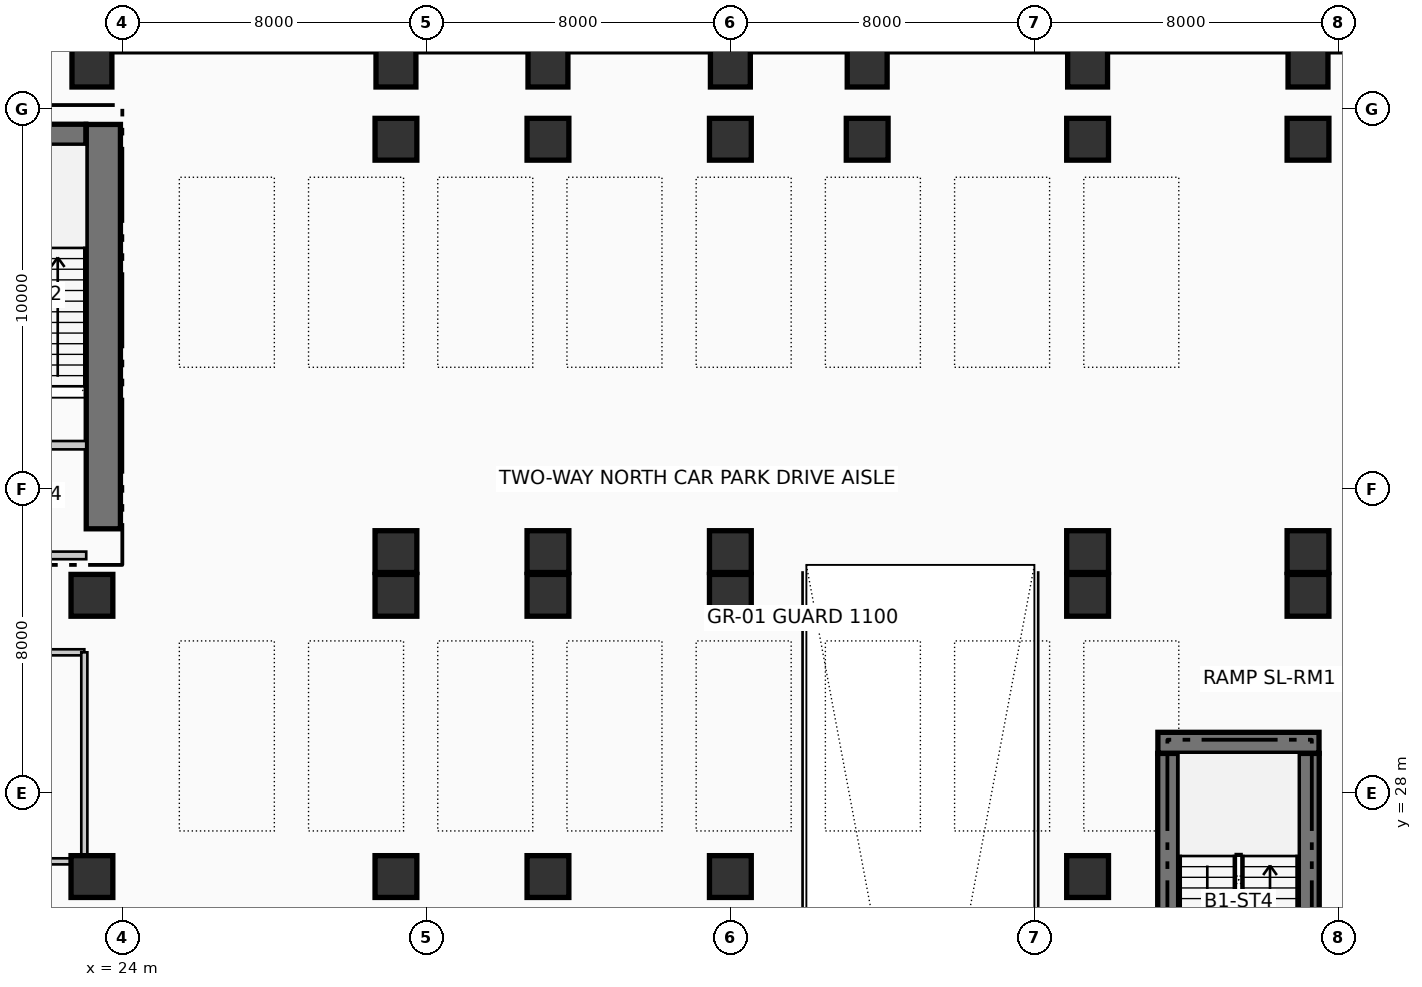
"""IFC4 building model, lengths in metres.
Left out: names, types, materials, properties, quantities, classifications, styles, units other than length and angle.
Written with IfcOpenShell. Run it as: python <this file> out.ifc"""

import sys

from ifc_helpers import new_model, si_unit, direction, frame, frame_2d, origin, origin_2d, place, context, subcontext, project, spatial, rectangle, extrude, element, save


model = new_model("IFC4")
c1 = context("Model", 3, precision=1e-05, world=origin(), true_north=direction((0.0, 1.0)))
c2 = subcontext(c1, "Body", "Model", "MODEL_VIEW")
j1 = project(units=[si_unit("LENGTHUNIT", "METRE"), si_unit("PLANEANGLEUNIT", "RADIAN")], contexts=[c1])
p1 = place(None, origin())
s1 = spatial("IfcSite", under=j1, at=p1, CompositionType="ELEMENT")
p2 = place(p1, origin())
s2 = spatial("IfcBuilding", under=s1, at=p2, CompositionType="ELEMENT")
p3 = place(p2, frame((0.0, 0.0, -4.62)))
s3 = spatial("IfcBuildingStorey", under=s2, at=p3, CompositionType="ELEMENT", Elevation=-4.62)
p4 = place(p3, frame((23.5, 34.95, 0.0), z_axis=(0.0, 0.0, 1.0), x_axis=(0.0, 1.0, 0.0)))
e1 = element("IfcWall", 1, at=p4, inside=s3, PredefinedType="SHEAR", context=c2, shape_type="SweptSolid", body=[
    extrude(rectangle(XDim=10.64, YDim=0.9, at=frame_2d((5.32, 0.0))), origin(), (0.0, 0.0, 1.0), 4.62),
])
p5 = place(p3, frame((19.35, 45.32, 0.0), z_axis=(0.0, 0.0, 1.0), x_axis=(1.0, 0.0, 0.0)))
e2 = element("IfcWall", 2, at=p5, inside=s3, PredefinedType="SHEAR", context=c2, shape_type="SweptSolid", body=[
    extrude(rectangle(XDim=3.69, YDim=0.55, at=frame_2d((1.845, 0.0))), origin(), (0.0, 0.0, 1.0), 4.62),
])
for number, where, z_axis, x_axis in (
    (3, (51.52, 21.15, 0.0), (0.0, 0.0, 1.0), (0.0, 1.0, 0.0)),
    (4, (55.22, 21.15, 0.0), (0.0, 0.0, 1.0), (0.0, 1.0, 0.0)),
):
    element("IfcWall", number, at=place(p3, frame(where, z_axis=z_axis, x_axis=x_axis)), inside=s3, PredefinedType="SHEAR", context=c2, shape_type="SweptSolid", body=[
        extrude(rectangle(XDim=7.89, YDim=0.55, at=frame_2d((3.945, 0.0))), origin(), (0.0, 0.0, 1.0), 4.62),
    ])
p6 = place(p3, frame((51.25, 29.32, 0.0), z_axis=(0.0, 0.0, 1.0), x_axis=(1.0, 0.0, 0.0)))
e5 = element("IfcWall", 5, at=p6, inside=s3, PredefinedType="SHEAR", context=c2, shape_type="SweptSolid", body=[
    extrude(rectangle(XDim=4.24, YDim=0.55, at=frame_2d((2.12, 0.0))), origin(), (0.0, 0.0, 1.0), 4.62),
])
for number, where, z_axis, x_axis in (
    (6, (23.2, 25.8, 0.0), (0.0, 0.0, 1.0), (1.0, 0.0, 0.0)),
    (7, (23.2, 33.2, 0.0), (0.0, 0.0, 1.0), (1.0, 0.0, 0.0)),
):
    element("IfcColumn", number, at=place(p3, frame(where, z_axis=z_axis, x_axis=x_axis)), inside=s3, PredefinedType="COLUMN", context=c2, shape_type="SweptSolid", body=[
        extrude(rectangle(XDim=1.1, YDim=1.1, at=origin_2d()), origin(), (0.0, 0.0, 1.0), 4.62),
    ])
p7 = place(p3, frame((23.2, 47.1, 0.0), z_axis=(0.0, 0.0, 1.0), x_axis=(1.0, 0.0, 0.0)))
e8 = element("IfcColumn", 8, at=p7, inside=s3, PredefinedType="COLUMN", context=c2, shape_type="SweptSolid", body=[
    extrude(rectangle(XDim=1.05, YDim=1.05, at=origin_2d()), origin(), (0.0, 0.0, 1.0), 4.62),
])
for number, where, z_axis, x_axis in (
    (9, (31.2, 25.8, 0.0), (0.0, 0.0, 1.0), (1.0, 0.0, 0.0)),
    (10, (31.2, 33.2, 0.0), (0.0, 0.0, 1.0), (1.0, 0.0, 0.0)),
    (11, (31.2, 34.35, 0.0), (0.0, 0.0, 1.0), (1.0, 0.0, 0.0)),
    (12, (31.2, 45.2, 0.0), (0.0, 0.0, 1.0), (1.0, 0.0, 0.0)),
):
    element("IfcColumn", number, at=place(p3, frame(where, z_axis=z_axis, x_axis=x_axis)), inside=s3, PredefinedType="COLUMN", context=c2, shape_type="SweptSolid", body=[
        extrude(rectangle(XDim=1.1, YDim=1.1, at=origin_2d()), origin(), (0.0, 0.0, 1.0), 4.62),
    ])
p8 = place(p3, frame((31.2, 47.1, 0.0), z_axis=(0.0, 0.0, 1.0), x_axis=(1.0, 0.0, 0.0)))
e13 = element("IfcColumn", 13, at=p8, inside=s3, PredefinedType="COLUMN", context=c2, shape_type="SweptSolid", body=[
    extrude(rectangle(XDim=1.05, YDim=1.05, at=origin_2d()), origin(), (0.0, 0.0, 1.0), 4.62),
])
for number, where, z_axis, x_axis in (
    (14, (35.2, 25.8, 0.0), (0.0, 0.0, 1.0), (1.0, 0.0, 0.0)),
    (15, (35.2, 33.2, 0.0), (0.0, 0.0, 1.0), (1.0, 0.0, 0.0)),
    (16, (35.2, 34.35, 0.0), (0.0, 0.0, 1.0), (1.0, 0.0, 0.0)),
    (17, (35.2, 45.2, 0.0), (0.0, 0.0, 1.0), (1.0, 0.0, 0.0)),
):
    element("IfcColumn", number, at=place(p3, frame(where, z_axis=z_axis, x_axis=x_axis)), inside=s3, PredefinedType="COLUMN", context=c2, shape_type="SweptSolid", body=[
        extrude(rectangle(XDim=1.1, YDim=1.1, at=origin_2d()), origin(), (0.0, 0.0, 1.0), 4.62),
    ])
p9 = place(p3, frame((35.2, 47.1, 0.0), z_axis=(0.0, 0.0, 1.0), x_axis=(1.0, 0.0, 0.0)))
e18 = element("IfcColumn", 18, at=p9, inside=s3, PredefinedType="COLUMN", context=c2, shape_type="SweptSolid", body=[
    extrude(rectangle(XDim=1.05, YDim=1.05, at=origin_2d()), origin(), (0.0, 0.0, 1.0), 4.62),
])
for number, where, z_axis, x_axis in (
    (19, (40.0, 25.8, 0.0), (0.0, 0.0, 1.0), (1.0, 0.0, 0.0)),
    (20, (40.0, 33.2, 0.0), (0.0, 0.0, 1.0), (1.0, 0.0, 0.0)),
    (21, (40.0, 34.35, 0.0), (0.0, 0.0, 1.0), (1.0, 0.0, 0.0)),
    (22, (40.0, 45.2, 0.0), (0.0, 0.0, 1.0), (1.0, 0.0, 0.0)),
):
    element("IfcColumn", number, at=place(p3, frame(where, z_axis=z_axis, x_axis=x_axis)), inside=s3, PredefinedType="COLUMN", context=c2, shape_type="SweptSolid", body=[
        extrude(rectangle(XDim=1.1, YDim=1.1, at=origin_2d()), origin(), (0.0, 0.0, 1.0), 4.62),
    ])
p10 = place(p3, frame((40.0, 47.1, 0.0), z_axis=(0.0, 0.0, 1.0), x_axis=(1.0, 0.0, 0.0)))
e23 = element("IfcColumn", 23, at=p10, inside=s3, PredefinedType="COLUMN", context=c2, shape_type="SweptSolid", body=[
    extrude(rectangle(XDim=1.05, YDim=1.05, at=origin_2d()), origin(), (0.0, 0.0, 1.0), 4.62),
])
p11 = place(p3, frame((43.6, 45.2, 0.0), z_axis=(0.0, 0.0, 1.0), x_axis=(1.0, 0.0, 0.0)))
e24 = element("IfcColumn", 24, at=p11, inside=s3, PredefinedType="COLUMN", context=c2, shape_type="SweptSolid", body=[
    extrude(rectangle(XDim=1.1, YDim=1.1, at=origin_2d()), origin(), (0.0, 0.0, 1.0), 4.62),
])
p12 = place(p3, frame((43.6, 47.1, 0.0), z_axis=(0.0, 0.0, 1.0), x_axis=(1.0, 0.0, 0.0)))
e25 = element("IfcColumn", 25, at=p12, inside=s3, PredefinedType="COLUMN", context=c2, shape_type="SweptSolid", body=[
    extrude(rectangle(XDim=1.05, YDim=1.05, at=origin_2d()), origin(), (0.0, 0.0, 1.0), 4.62),
])
for number, where, z_axis, x_axis in (
    (26, (49.4, 25.8, 0.0), (0.0, 0.0, 1.0), (1.0, 0.0, 0.0)),
    (27, (49.4, 33.2, 0.0), (0.0, 0.0, 1.0), (1.0, 0.0, 0.0)),
    (28, (49.4, 34.35, 0.0), (0.0, 0.0, 1.0), (1.0, 0.0, 0.0)),
    (29, (49.4, 45.2, 0.0), (0.0, 0.0, 1.0), (1.0, 0.0, 0.0)),
):
    element("IfcColumn", number, at=place(p3, frame(where, z_axis=z_axis, x_axis=x_axis)), inside=s3, PredefinedType="COLUMN", context=c2, shape_type="SweptSolid", body=[
        extrude(rectangle(XDim=1.1, YDim=1.1, at=origin_2d()), origin(), (0.0, 0.0, 1.0), 4.62),
    ])
p13 = place(p3, frame((49.4, 47.1, 0.0), z_axis=(0.0, 0.0, 1.0), x_axis=(1.0, 0.0, 0.0)))
e30 = element("IfcColumn", 30, at=p13, inside=s3, PredefinedType="COLUMN", context=c2, shape_type="SweptSolid", body=[
    extrude(rectangle(XDim=1.05, YDim=1.05, at=origin_2d()), origin(), (0.0, 0.0, 1.0), 4.62),
])
for number, where, z_axis, x_axis in (
    (31, (55.2, 33.2, 0.0), (0.0, 0.0, 1.0), (1.0, 0.0, 0.0)),
    (32, (55.2, 34.35, 0.0), (0.0, 0.0, 1.0), (1.0, 0.0, 0.0)),
    (33, (55.2, 45.2, 0.0), (0.0, 0.0, 1.0), (1.0, 0.0, 0.0)),
):
    element("IfcColumn", number, at=place(p3, frame(where, z_axis=z_axis, x_axis=x_axis)), inside=s3, PredefinedType="COLUMN", context=c2, shape_type="SweptSolid", body=[
        extrude(rectangle(XDim=1.1, YDim=1.1, at=origin_2d()), origin(), (0.0, 0.0, 1.0), 4.62),
    ])
p14 = place(p3, frame((55.2, 47.1, 0.0), z_axis=(0.0, 0.0, 1.0), x_axis=(1.0, 0.0, 0.0)))
e34 = element("IfcColumn", 34, at=p14, inside=s3, PredefinedType="COLUMN", context=c2, shape_type="SweptSolid", body=[
    extrude(rectangle(XDim=1.05, YDim=1.05, at=origin_2d()), origin(), (0.0, 0.0, 1.0), 4.62),
])
p15 = place(p3, frame((19.9, 37.15, 0.0), z_axis=(0.0, 0.0, 1.0), x_axis=(1.0, 0.0, 0.0)))
e35 = element("IfcWall", 35, at=p15, inside=s3, PredefinedType="PARTITIONING", context=c2, shape_type="SweptSolid", body=[
    extrude(rectangle(XDim=3.15, YDim=0.22, at=frame_2d((1.575, 0.0))), origin(), (0.0, 0.0, 1.0), 4.3),
])
p16 = place(p15, frame((2.05, 0.0, 0.0), z_axis=(0.0, 0.0, 1.0), x_axis=(-1.0, 0.0, 0.0)))
e36 = element("IfcOpeningElement", 36, at=p16, cuts=e35, PredefinedType="OPENING", context=c2, shape_type="SweptSolid", body=[
    extrude(rectangle(XDim=1.05, YDim=2.15, at=frame_2d((0.525, 1.075))), frame((0.0, 0.12, 0.0), z_axis=(0.0, -1.0, 0.0), x_axis=(1.0, 0.0, 0.0)), (0.0, 0.0, 1.0), 0.24),
])
p17 = place(p3, frame((19.8, 34.25, 0.0), z_axis=(0.0, 0.0, 1.0), x_axis=(1.0, 0.0, 0.0)))
e37 = element("IfcWall", 37, at=p17, inside=s3, PredefinedType="PARTITIONING", context=c2, shape_type="SweptSolid", body=[
    extrude(rectangle(XDim=3.25, YDim=0.2, at=frame_2d((1.625, 0.0))), origin(), (0.0, 0.0, 1.0), 4.3),
])
p18 = place(p17, frame((2.15, 0.0, 0.0), z_axis=(0.0, 0.0, 1.0), x_axis=(-1.0, 0.0, 0.0)))
e38 = element("IfcOpeningElement", 38, at=p18, cuts=e37, PredefinedType="OPENING", context=c2, shape_type="SweptSolid", body=[
    extrude(rectangle(XDim=1.1, YDim=2.15, at=frame_2d((0.55, 1.075))), frame((0.0, 0.11, 0.0), z_axis=(0.0, -1.0, 0.0), x_axis=(1.0, 0.0, 0.0)), (0.0, 0.0, 1.0), 0.22),
])
p19 = place(p3, frame((9.0, 26.2, 0.0), z_axis=(0.0, 0.0, 1.0), x_axis=(1.0, 0.0, 0.0)))
e39 = element("IfcWall", 39, at=p19, inside=s3, PredefinedType="PARTITIONING", context=c2, shape_type="SweptSolid", body=[
    extrude(rectangle(XDim=14.0, YDim=0.16, at=frame_2d((7.0, 0.0))), origin(), (0.0, 0.0, 1.0), 3.485),
])
p20 = place(p19, frame((1.0, 0.0, 0.0)))
e40 = element("IfcOpeningElement", 40, at=p20, cuts=e39, PredefinedType="OPENING", context=c2, shape_type="SweptSolid", body=[
    extrude(rectangle(XDim=0.95, YDim=2.1, at=frame_2d((0.475, 1.05))), frame((0.0, 0.09, 0.0), z_axis=(0.0, -1.0, 0.0), x_axis=(1.0, 0.0, 0.0)), (0.0, 0.0, 1.0), 0.18),
])
p21 = place(p19, frame((9.5, 0.0, 0.0)))
e41 = element("IfcOpeningElement", 41, at=p21, cuts=e39, PredefinedType="OPENING", context=c2, shape_type="SweptSolid", body=[
    extrude(rectangle(XDim=0.95, YDim=2.1, at=frame_2d((0.475, 1.05))), frame((0.0, 0.09, 0.0), z_axis=(0.0, -1.0, 0.0), x_axis=(1.0, 0.0, 0.0)), (0.0, 0.0, 1.0), 0.18),
])
p22 = place(p3, frame((9.0, 31.7, 0.0), z_axis=(0.0, 0.0, 1.0), x_axis=(1.0, 0.0, 0.0)))
e42 = element("IfcWall", 42, at=p22, inside=s3, PredefinedType="PARTITIONING", context=c2, shape_type="SweptSolid", body=[
    extrude(rectangle(XDim=14.0, YDim=0.16, at=frame_2d((7.0, 0.0))), origin(), (0.0, 0.0, 1.0), 4.3),
])
p23 = place(p3, frame((23.0, 26.2, 0.0), z_axis=(0.0, 0.0, 1.0), x_axis=(0.0, 1.0, 0.0)))
e43 = element("IfcWall", 43, at=p23, inside=s3, PredefinedType="PARTITIONING", context=c2, shape_type="SweptSolid", body=[
    extrude(rectangle(XDim=5.5, YDim=0.16, at=frame_2d((2.75, 0.0))), origin(), (0.0, 0.0, 1.0), 3.485),
])
save(model, sys.argv[1])
